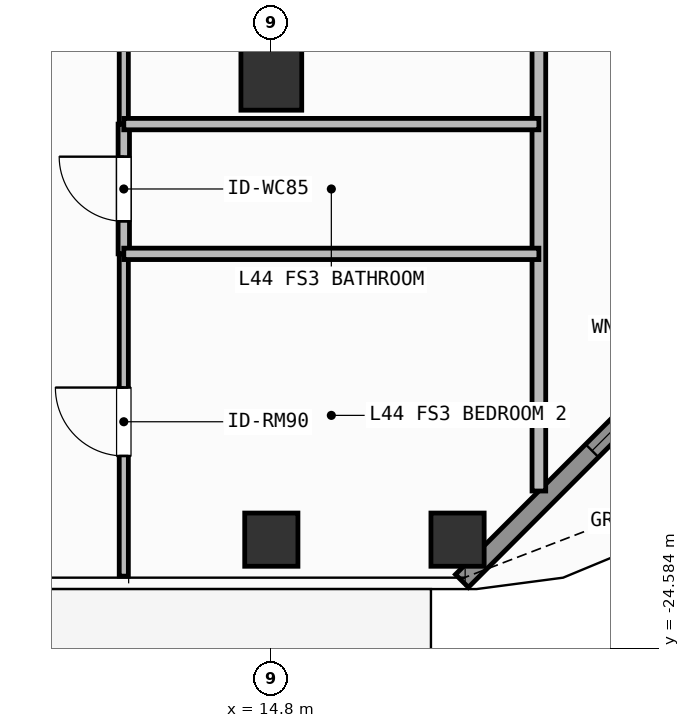
"""IFC4 building model, lengths in metres.
Left out: names, types, materials, properties, quantities, classifications, styles, units other than length and angle.
Written with IfcOpenShell. Run it as: python <this file> out.ifc"""

import sys

from ifc_helpers import new_model, si_unit, direction, frame, frame_2d, origin, origin_2d, place, context, subcontext, project, spatial, rectangle, hollow_rectangle, extrude, element, fill, save


model = new_model("IFC4")
c1 = context("Model", 3, precision=1e-05, world=origin(), true_north=direction((0.0, 1.0)))
c2 = subcontext(c1, "Body", "Model", "MODEL_VIEW")
j1 = project(units=[si_unit("LENGTHUNIT", "METRE"), si_unit("PLANEANGLEUNIT", "RADIAN")], contexts=[c1])
p1 = place(None, origin())
s1 = spatial("IfcSite", under=j1, at=p1, CompositionType="ELEMENT")
p2 = place(p1, origin())
s2 = spatial("IfcBuilding", under=s1, at=p2, CompositionType="ELEMENT")
p3 = place(p2, frame((0.0, 0.0, 179.7)))
s3 = spatial("IfcBuildingStorey", under=s2, at=p3, CompositionType="ELEMENT", Elevation=179.7)
p4 = place(p3, frame((14.8, -17.1, 0.0), z_axis=(0.0, 0.0, 1.0), x_axis=(1.0, 0.0, 0.0)))
e1 = element("IfcColumn", 1, at=p4, inside=s3, PredefinedType="COLUMN", context=c2, shape_type="SweptSolid", body=[
    extrude(hollow_rectangle(XDim=0.8, YDim=0.8, WallThickness=0.036, at=origin_2d()), origin(), (0.0, 0.0, 1.0), 3.9),
])
for number, where, z_axis, x_axis in (
    (2, (17.25, -23.15, 0.0), (0.0, 0.0, 1.0), (1.0, 0.0, 0.0)),
    (3, (14.8, -23.15, 0.0), (0.0, 0.0, 1.0), (1.0, 0.0, 0.0)),
):
    element("IfcColumn", number, at=place(p3, frame(where, z_axis=z_axis, x_axis=x_axis)), inside=s3, PredefinedType="COLUMN", context=c2, shape_type="SweptSolid", body=[
        extrude(hollow_rectangle(XDim=0.7, YDim=0.7, WallThickness=0.032, at=origin_2d()), origin(), (0.0, 0.0, 1.0), 3.9),
    ])
p5 = place(p3, frame((21.792, -19.208, 0.0), z_axis=(0.0, 0.0, 1.0), x_axis=(-0.707106781187, -0.707106781187, 0.0)))
e4 = element("IfcWall", 4, at=p5, inside=s3, PredefinedType="SOLIDWALL", context=c2, shape_type="SweptSolid", body=[
    extrude(rectangle(XDim=6.343, YDim=0.24, at=frame_2d((3.171, 0.0))), origin(), (0.0, 0.0, 1.0), 3.68),
])
p6 = place(p5, frame((2.421, 0.0, 0.8)))
e5 = element("IfcOpeningElement", 5, at=p6, cuts=e4, PredefinedType="OPENING", context=c2, shape_type="SweptSolid", body=[
    extrude(rectangle(XDim=1.5, YDim=1.85, at=frame_2d((0.75, 0.925))), frame((0.0, 0.13, 0.0), z_axis=(0.0, -1.0, 0.0), x_axis=(1.0, 0.0, 0.0)), (0.0, 0.0, 1.0), 0.26),
])
p7 = place(p3, frame((12.859, -19.39, 0.0), z_axis=(0.0, 0.0, 1.0), x_axis=(0.0, 1.0, 0.0)))
e6 = element("IfcWall", 6, at=p7, inside=s3, PredefinedType="PARTITIONING", context=c2, shape_type="SweptSolid", body=[
    extrude(rectangle(XDim=1.707, YDim=0.15, at=frame_2d((0.854, 0.0))), origin(), (0.0, 0.0, 1.0), 3.68),
])
p8 = place(p7, frame((0.428, 0.0, 0.0)))
e7 = element("IfcOpeningElement", 7, at=p8, cuts=e6, PredefinedType="OPENING", context=c2, shape_type="SweptSolid", body=[
    extrude(rectangle(XDim=0.85, YDim=2.1, at=frame_2d((0.425, 1.05))), frame((0.0, 0.085, 0.0), z_axis=(0.0, -1.0, 0.0), x_axis=(1.0, 0.0, 0.0)), (0.0, 0.0, 1.0), 0.17),
])
p9 = place(p3, frame((12.859, -17.683, 0.0), z_axis=(0.0, 0.0, 1.0), x_axis=(0.0, 1.0, 0.0)))
e8 = element("IfcWall", 8, at=p9, inside=s3, PredefinedType="PARTITIONING", context=c2, shape_type="SweptSolid", body=[
    extrude(rectangle(XDim=3.983, YDim=0.12, at=frame_2d((1.992, 0.0))), origin(), (0.0, 0.0, 1.0), 3.68),
])
p10 = place(p9, frame((1.391, 0.0, 0.0)))
e9 = element("IfcOpeningElement", 9, at=p10, cuts=e8, PredefinedType="OPENING", context=c2, shape_type="SweptSolid", body=[
    extrude(rectangle(XDim=0.85, YDim=2.1, at=frame_2d((0.425, 1.05))), frame((0.0, 0.07, 0.0), z_axis=(0.0, -1.0, 0.0), x_axis=(1.0, 0.0, 0.0)), (0.0, 0.0, 1.0), 0.14),
])
p11 = place(p3, frame((12.859, -23.63, 0.0), z_axis=(0.0, 0.0, 1.0), x_axis=(0.0, 1.0, 0.0)))
e10 = element("IfcWall", 10, at=p11, inside=s3, PredefinedType="PARTITIONING", context=c2, shape_type="SweptSolid", body=[
    extrude(rectangle(XDim=4.24, YDim=0.12, at=frame_2d((2.12, 0.0))), origin(), (0.0, 0.0, 1.0), 3.68),
])
p12 = place(p11, frame((1.581, 0.0, 0.0)))
e11 = element("IfcOpeningElement", 11, at=p12, cuts=e10, PredefinedType="OPENING", context=c2, shape_type="SweptSolid", body=[
    extrude(rectangle(XDim=0.9, YDim=2.1, at=frame_2d((0.45, 1.05))), frame((0.0, 0.07, 0.0), z_axis=(0.0, -1.0, 0.0), x_axis=(1.0, 0.0, 0.0)), (0.0, 0.0, 1.0), 0.14),
])
p13 = place(p3, frame((18.32, -22.51, 0.0), z_axis=(0.0, 0.0, 1.0), x_axis=(0.0, 1.0, 0.0)))
e12 = element("IfcWall", 12, at=p13, inside=s3, PredefinedType="PARTITIONING", context=c2, shape_type="SweptSolid", body=[
    extrude(rectangle(XDim=8.81, YDim=0.18, at=frame_2d((4.405, 0.0))), origin(), (0.0, 0.0, 1.0), 3.68),
])
for number, where, z_axis, x_axis in (
    (13, (12.859, -17.683, 0.0), (0.0, 0.0, 1.0), (1.0, 0.0, 0.0)),
    (14, (12.859, -19.39, 0.0), (0.0, 0.0, 1.0), (1.0, 0.0, 0.0)),
):
    element("IfcWall", number, at=place(p3, frame(where, z_axis=z_axis, x_axis=x_axis)), inside=s3, PredefinedType="PARTITIONING", context=c2, shape_type="SweptSolid", body=[
        extrude(rectangle(XDim=5.461, YDim=0.15, at=frame_2d((2.73, 0.0))), origin(), (0.0, 0.0, 1.0), 3.68),
    ])
p14 = place(p6, origin())
e15 = element("IfcWindow", 15, at=p14, inside=s3, PartitioningType="SINGLE_PANEL", PredefinedType="WINDOW", context=c2, shape_type="SweptSolid", body=[
    extrude(rectangle(XDim=1.5, YDim=1.85, at=frame_2d((0.75, 0.925))), frame((0.0, 0.03, 0.0), z_axis=(0.0, -1.0, 0.0), x_axis=(1.0, 0.0, 0.0)), (0.0, 0.0, 1.0), 0.06),
])
fill(e5, e15)
p15 = place(p8, origin())
e16 = element("IfcDoor", 16, at=p15, inside=s3, OperationType="SINGLE_SWING_RIGHT", PredefinedType="DOOR", context=c2, shape_type="SweptSolid", body=[
    extrude(rectangle(XDim=0.85, YDim=2.1, at=frame_2d((0.425, 1.05))), frame((0.0, 0.025, 0.0), z_axis=(0.0, -1.0, 0.0), x_axis=(1.0, 0.0, 0.0)), (0.0, 0.0, 1.0), 0.05),
])
fill(e7, e16)
p16 = place(p12, origin())
e17 = element("IfcDoor", 17, at=p16, inside=s3, OperationType="SINGLE_SWING_RIGHT", PredefinedType="DOOR", context=c2, shape_type="SweptSolid", body=[
    extrude(rectangle(XDim=0.9, YDim=2.1, at=frame_2d((0.45, 1.05))), frame((0.0, 0.025, 0.0), z_axis=(0.0, -1.0, 0.0), x_axis=(1.0, 0.0, 0.0)), (0.0, 0.0, 1.0), 0.05),
])
fill(e11, e17)
save(model, sys.argv[1])
